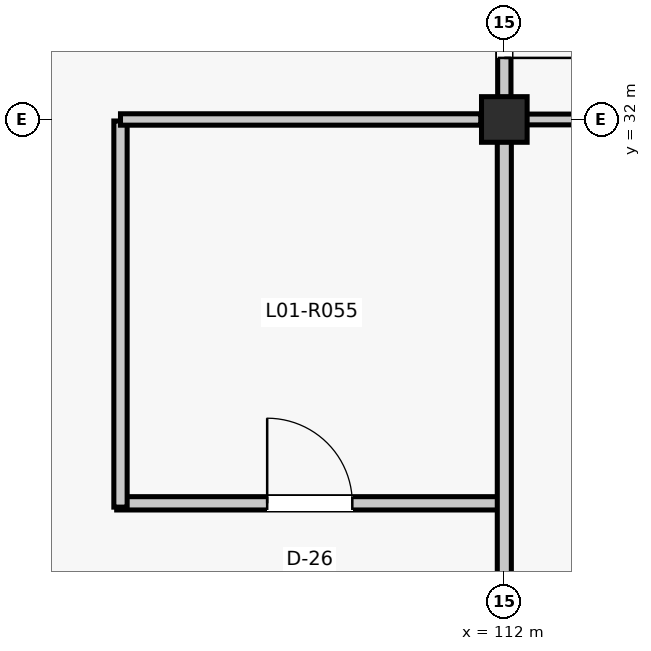
"""IFC4 building model, lengths in metres.
Left out: names, types, materials, properties, quantities, classifications, styles, units other than length and angle.
Written with IfcOpenShell. Run it as: python <this file> out.ifc"""

import sys

from ifc_helpers import new_model, si_unit, direction, frame, frame_2d, origin, origin_2d, place, context, subcontext, project, spatial, rectangle, extrude, element, fill, save


model = new_model("IFC4")
c1 = context("Model", 3, precision=1e-05, world=origin(), true_north=direction((0.0, 1.0)))
c2 = subcontext(c1, "Body", "Model", "MODEL_VIEW")
j1 = project(units=[si_unit("LENGTHUNIT", "METRE"), si_unit("PLANEANGLEUNIT", "RADIAN")], contexts=[c1])
p1 = place(None, origin())
s1 = spatial("IfcSite", under=j1, at=p1, CompositionType="ELEMENT")
p2 = place(p1, origin())
s2 = spatial("IfcBuilding", under=s1, at=p2, CompositionType="ELEMENT")
p3 = place(p2, frame((0.0, 0.0, 5.28)))
s3 = spatial("IfcBuildingStorey", under=s2, at=p3, CompositionType="ELEMENT", Elevation=5.28)
p4 = place(p3, frame((112.0, 32.0, 0.0), z_axis=(0.0, 0.0, 1.0), x_axis=(1.0, 0.0, 0.0)))
e1 = element("IfcColumn", 1, at=p4, inside=s3, PredefinedType="COLUMN", context=c2, shape_type="SweptSolid", body=[
    extrude(rectangle(XDim=0.6, YDim=0.6, at=origin_2d()), origin(), (0.0, 0.0, 1.0), 4.62),
])
p5 = place(p3, frame((106.9, 26.95, 0.0), z_axis=(0.0, 0.0, 1.0), x_axis=(1.0, 0.0, 0.0)))
e2 = element("IfcWall", 2, at=p5, inside=s3, PredefinedType="PARTITIONING", context=c2, shape_type="SweptSolid", body=[
    extrude(rectangle(XDim=5.08, YDim=0.175, at=frame_2d((2.54, 0.0))), origin(), (0.0, 0.0, 1.0), 3.857),
])
p6 = place(p5, frame((1.98, 0.0, 0.0)))
e3 = element("IfcOpeningElement", 3, at=p6, cuts=e2, PredefinedType="OPENING", context=c2, shape_type="SweptSolid", body=[
    extrude(rectangle(XDim=1.12, YDim=2.22, at=frame_2d((0.56, 1.11))), frame((0.0, 0.097, 0.0), z_axis=(0.0, -1.0, 0.0), x_axis=(1.0, 0.0, 0.0)), (0.0, 0.0, 1.0), 0.195),
])
p7 = place(p3, frame((106.95, 26.9, 0.0), z_axis=(0.0, 0.0, 1.0), x_axis=(0.0, 1.0, 0.0)))
e4 = element("IfcWall", 4, at=p7, inside=s3, PredefinedType="PARTITIONING", context=c2, shape_type="SweptSolid", body=[
    extrude(rectangle(XDim=5.08, YDim=0.175, at=frame_2d((2.54, 0.0))), origin(), (0.0, 0.0, 1.0), 3.787),
])
p8 = place(p3, frame((106.95, 32.0, 0.0), z_axis=(0.0, 0.0, 1.0), x_axis=(1.0, 0.0, 0.0)))
e5 = element("IfcWall", 5, at=p8, inside=s3, PredefinedType="PARTITIONING", context=c2, shape_type="SweptSolid", body=[
    extrude(rectangle(XDim=4.74, YDim=0.15, at=frame_2d((2.37, 0.0))), origin(), (0.0, 0.0, 1.0), 3.787),
])
p9 = place(p3, frame((112.0, 24.29, 0.0), z_axis=(0.0, 0.0, 1.0), x_axis=(0.0, 1.0, 0.0)))
e6 = element("IfcWall", 6, at=p9, inside=s3, PredefinedType="PARTITIONING", context=c2, shape_type="SweptSolid", body=[
    extrude(rectangle(XDim=7.42, YDim=0.185, at=frame_2d((3.71, 0.0))), origin(), (0.0, 0.0, 1.0), 3.857),
])
p10 = place(p9, frame((0.52, 0.0, 0.0)))
e7 = element("IfcOpeningElement", 7, at=p10, cuts=e6, PredefinedType="OPENING", context=c2, shape_type="SweptSolid", body=[
    extrude(rectangle(XDim=0.94, YDim=2.12, at=frame_2d((0.47, 1.06))), frame((0.0, 0.103, 0.0), z_axis=(0.0, -1.0, 0.0), x_axis=(1.0, 0.0, 0.0)), (0.0, 0.0, 1.0), 0.205),
])
p11 = place(p3, frame((112.0, 32.29, 0.0), z_axis=(0.0, 0.0, 1.0), x_axis=(0.0, 1.0, 0.0)))
e8 = element("IfcWall", 8, at=p11, inside=s3, PredefinedType="PARTITIONING", context=c2, shape_type="SweptSolid", body=[
    extrude(rectangle(XDim=7.42, YDim=0.175, at=frame_2d((3.71, 0.0))), origin(), (0.0, 0.0, 1.0), 3.781),
])
p12 = place(p11, frame((0.52, 0.0, 0.0)))
e9 = element("IfcOpeningElement", 9, at=p12, cuts=e8, PredefinedType="OPENING", context=c2, shape_type="SweptSolid", body=[
    extrude(rectangle(XDim=0.94, YDim=2.12, at=frame_2d((0.47, 1.06))), frame((0.0, 0.097, 0.0), z_axis=(0.0, -1.0, 0.0), x_axis=(1.0, 0.0, 0.0)), (0.0, 0.0, 1.0), 0.195),
])
p13 = place(p3, frame((112.29, 32.0, 0.0), z_axis=(0.0, 0.0, 1.0), x_axis=(1.0, 0.0, 0.0)))
e10 = element("IfcWall", 10, at=p13, inside=s3, PredefinedType="PARTITIONING", context=c2, shape_type="SweptSolid", body=[
    extrude(rectangle(XDim=7.71, YDim=0.142, at=frame_2d((3.855, 0.0))), origin(), (0.0, 0.0, 1.0), 4.325),
])
p14 = place(p6, origin())
e11 = element("IfcDoor", 11, at=p14, inside=s3, OperationType="SINGLE_SWING_LEFT", PredefinedType="DOOR", context=c2, shape_type="SweptSolid", body=[
    extrude(rectangle(XDim=1.12, YDim=2.22, at=frame_2d((0.56, 1.11))), frame((0.0, 0.025, 0.0), z_axis=(0.0, -1.0, 0.0), x_axis=(1.0, 0.0, 0.0)), (0.0, 0.0, 1.0), 0.05),
])
fill(e3, e11)
p15 = place(p12, frame((0.94, 0.0, 0.0), z_axis=(0.0, 0.0, 1.0), x_axis=(-1.0, 0.0, 0.0)))
e12 = element("IfcDoor", 12, at=p15, inside=s3, OperationType="SINGLE_SWING_LEFT", PredefinedType="DOOR", context=c2, shape_type="SweptSolid", body=[
    extrude(rectangle(XDim=0.94, YDim=2.12, at=frame_2d((0.47, 1.06))), frame((0.0, 0.025, 0.0), z_axis=(0.0, -1.0, 0.0), x_axis=(1.0, 0.0, 0.0)), (0.0, 0.0, 1.0), 0.05),
])
fill(e9, e12)
save(model, sys.argv[1])
